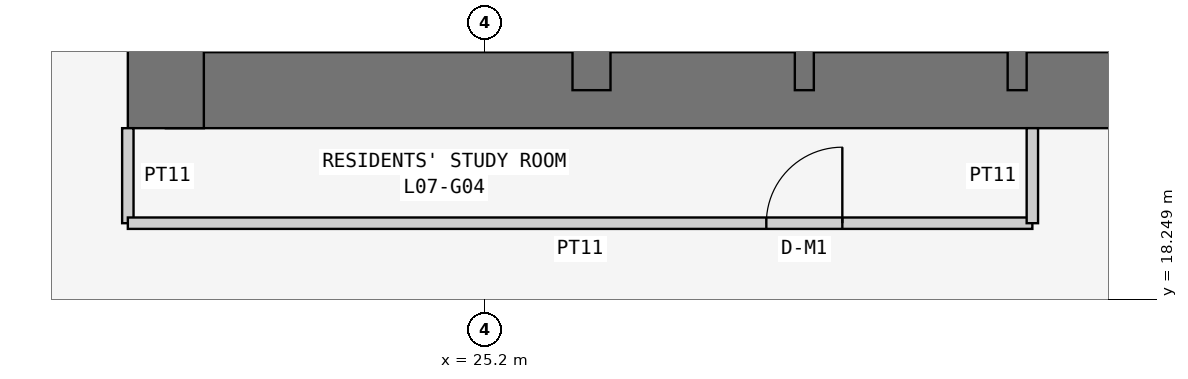
"""IFC4 building model, lengths in metres.
Left out: names, types, materials, properties, quantities, classifications, styles, units other than length and angle.
Written with IfcOpenShell. Run it as: python <this file> out.ifc"""

import sys

from ifc_helpers import new_model, si_unit, direction, frame, frame_2d, origin, place, context, subcontext, project, spatial, rectangle, extrude, element, fill, save


model = new_model("IFC4")
c1 = context("Model", 3, precision=1e-05, world=origin(), true_north=direction((0.0, 1.0)))
c2 = subcontext(c1, "Body", "Model", "MODEL_VIEW")
j1 = project(units=[si_unit("LENGTHUNIT", "METRE"), si_unit("PLANEANGLEUNIT", "RADIAN")], contexts=[c1])
p1 = place(None, origin())
s1 = spatial("IfcSite", under=j1, at=p1, CompositionType="ELEMENT")
p2 = place(p1, origin())
s2 = spatial("IfcBuilding", under=s1, at=p2, CompositionType="ELEMENT")
p3 = place(p2, frame((0.0, 0.0, 34.5)))
s3 = spatial("IfcBuildingStorey", under=s2, at=p3, CompositionType="ELEMENT", Elevation=34.5)
p4 = place(p3, frame((21.0, 21.0, 0.0), z_axis=(0.0, 0.0, 1.0), x_axis=(1.0, 0.0, 0.0)))
e1 = element("IfcWall", 1, at=p4, inside=s3, PredefinedType="SHEAR", context=c2, shape_type="SweptSolid", body=[
    extrude(rectangle(XDim=17.3, YDim=1.0, at=frame_2d((8.65, 0.0))), origin(), (0.0, 0.0, 1.0), 3.6),
])
p5 = place(p3, frame((21.0, 37.8, 0.0), z_axis=(0.0, 0.0, 1.0), x_axis=(0.0, -1.0, 0.0)))
e2 = element("IfcWall", 2, at=p5, inside=s3, PredefinedType="SHEAR", context=c2, shape_type="SweptSolid", body=[
    extrude(rectangle(XDim=17.3, YDim=1.0, at=frame_2d((8.65, 0.0))), origin(), (0.0, 0.0, 1.0), 3.6),
])
p6 = place(p5, frame((5.4, 0.0, 0.0)))
e3 = element("IfcOpeningElement", 3, at=p6, cuts=e2, PredefinedType="OPENING", context=c2, shape_type="SweptSolid", body=[
    extrude(rectangle(XDim=1.2, YDim=2.1, at=frame_2d((0.6, 1.05))), frame((0.0, 0.51, 0.0), z_axis=(0.0, -1.0, 0.0), x_axis=(1.0, 0.0, 0.0)), (0.0, 0.0, 1.0), 1.02),
])
p7 = place(p3, frame((26.6, 21.0, 0.0), z_axis=(0.0, 0.0, 1.0), x_axis=(0.0, 1.0, 0.0)))
e4 = element("IfcWall", 4, at=p7, inside=s3, PredefinedType="SHEAR", context=c2, shape_type="SweptSolid", body=[
    extrude(rectangle(XDim=16.8, YDim=0.5, at=frame_2d((8.4, 0.0))), origin(), (0.0, 0.0, 1.0), 3.6),
])
p8 = place(p7, frame((10.4, 0.0, 0.0)))
e5 = element("IfcOpeningElement", 5, at=p8, cuts=e4, PredefinedType="OPENING", context=c2, shape_type="SweptSolid", body=[
    extrude(rectangle(XDim=1.2, YDim=2.1, at=frame_2d((0.6, 1.05))), frame((0.0, 0.26, 0.0), z_axis=(0.0, -1.0, 0.0), x_axis=(1.0, 0.0, 0.0)), (0.0, 0.0, 1.0), 0.52),
])
for number, where, z_axis, x_axis in (
    (6, (29.4, 21.0, 0.0), (0.0, 0.0, 1.0), (0.0, 1.0, 0.0)),
    (7, (32.2, 21.0, 0.0), (0.0, 0.0, 1.0), (0.0, 1.0, 0.0)),
):
    element("IfcWall", number, at=place(p3, frame(where, z_axis=z_axis, x_axis=x_axis)), inside=s3, PredefinedType="SHEAR", context=c2, shape_type="SweptSolid", body=[
        extrude(rectangle(XDim=3.2, YDim=0.25, at=frame_2d((1.6, 0.0))), origin(), (0.0, 0.0, 1.0), 3.6),
    ])
p9 = place(p3, frame((20.5, 20.5, 0.0), z_axis=(0.0, 0.0, 1.0), x_axis=(0.0, -1.0, 0.0)))
e8 = element("IfcWall", 8, at=p9, inside=s3, PredefinedType="PARTITIONING", context=c2, shape_type="SweptSolid", body=[
    extrude(rectangle(XDim=1.25, YDim=0.15, at=frame_2d((0.625, 0.0))), origin(), (0.0, 0.0, 1.0), 3.45),
])
p10 = place(p3, frame((20.5, 19.25, 0.0), z_axis=(0.0, 0.0, 1.0), x_axis=(1.0, 0.0, 0.0)))
e9 = element("IfcWall", 9, at=p10, inside=s3, PredefinedType="PARTITIONING", context=c2, shape_type="SweptSolid", body=[
    extrude(rectangle(XDim=11.9, YDim=0.15, at=frame_2d((5.95, 0.0))), origin(), (0.0, 0.0, 1.0), 3.45),
])
p11 = place(p10, frame((8.4, 0.0, 0.0)))
e10 = element("IfcOpeningElement", 10, at=p11, cuts=e9, PredefinedType="OPENING", context=c2, shape_type="SweptSolid", body=[
    extrude(rectangle(XDim=1.0, YDim=2.1, at=frame_2d((0.5, 1.05))), frame((0.0, 0.085, 0.0), z_axis=(0.0, -1.0, 0.0), x_axis=(1.0, 0.0, 0.0)), (0.0, 0.0, 1.0), 0.17),
])
p12 = place(p3, frame((32.4, 19.25, 0.0), z_axis=(0.0, 0.0, 1.0), x_axis=(0.0, 1.0, 0.0)))
e11 = element("IfcWall", 11, at=p12, inside=s3, PredefinedType="PARTITIONING", context=c2, shape_type="SweptSolid", body=[
    extrude(rectangle(XDim=1.25, YDim=0.15, at=frame_2d((0.625, 0.0))), origin(), (0.0, 0.0, 1.0), 3.45),
])
p13 = place(p11, origin())
e12 = element("IfcDoor", 12, at=p13, inside=s3, OperationType="SINGLE_SWING_RIGHT", PredefinedType="DOOR", context=c2, shape_type="SweptSolid", body=[
    extrude(rectangle(XDim=1.0, YDim=2.1, at=frame_2d((0.5, 1.05))), frame((0.0, 0.025, 0.0), z_axis=(0.0, -1.0, 0.0), x_axis=(1.0, 0.0, 0.0)), (0.0, 0.0, 1.0), 0.05),
])
fill(e10, e12)
save(model, sys.argv[1])
